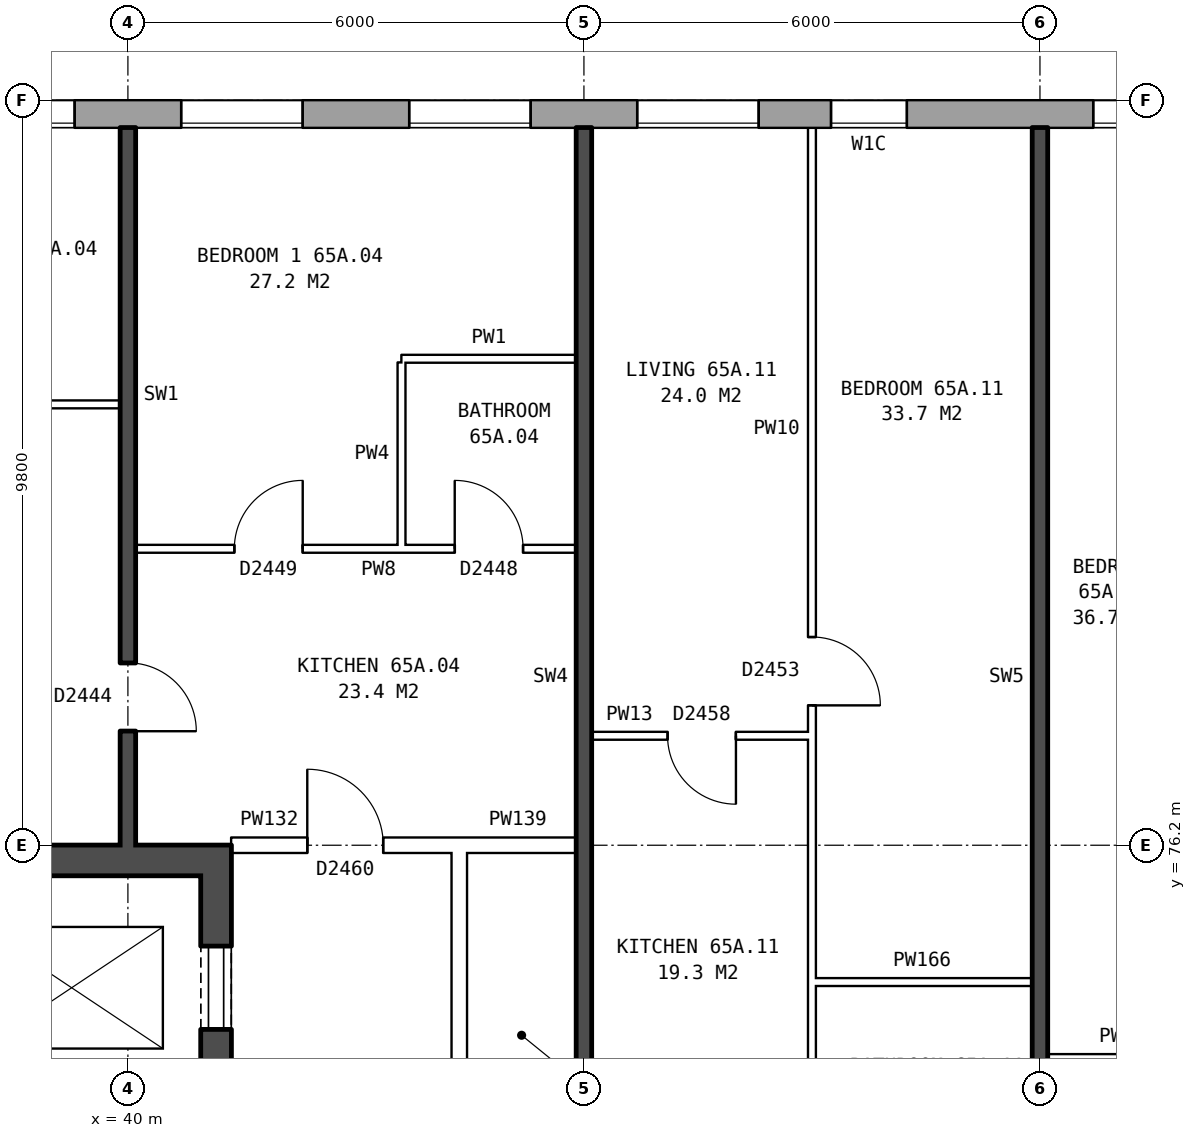
"""IFC4 building model, lengths in metres.
Left out: names, types, materials, properties, quantities, classifications, styles, units other than length and angle.
Written with IfcOpenShell. Run it as: python <this file> out.ifc"""

import sys

from ifc_helpers import new_model, si_unit, direction, frame, frame_2d, origin, place, context, subcontext, project, spatial, rectangle, extrude, element, fill, save


model = new_model("IFC4")
c1 = context("Model", 3, precision=1e-05, world=origin(), true_north=direction((0.0, 1.0)))
c2 = subcontext(c1, "Body", "Model", "MODEL_VIEW")
j1 = project(units=[si_unit("LENGTHUNIT", "METRE"), si_unit("PLANEANGLEUNIT", "RADIAN")], contexts=[c1])
p1 = place(None, origin())
s1 = spatial("IfcSite", under=j1, at=p1, CompositionType="ELEMENT")
p2 = place(p1, origin())
s2 = spatial("IfcBuilding", under=s1, at=p2, CompositionType="ELEMENT")
p3 = place(p2, frame((0.0, 0.0, 230.7)))
s3 = spatial("IfcBuildingStorey", under=s2, at=p3, CompositionType="ELEMENT", Elevation=230.7)
p4 = place(p3, frame((74.95, 85.82, 0.0), z_axis=(0.0, 0.0, 1.0), x_axis=(-1.0, 0.0, 0.0)))
e1 = element("IfcWall", 1, at=p4, inside=s3, PredefinedType="STANDARD", context=c2, shape_type="SweptSolid", body=[
    extrude(rectangle(XDim=39.875, YDim=0.36, at=frame_2d((19.938, 0.0))), origin(), (0.0, 0.0, 1.0), 2.85),
])
p5 = place(p4, frame((2.65, 0.0, 0.8)))
e2 = element("IfcOpeningElement", 2, at=p5, cuts=e1, PredefinedType="OPENING", context=c2, shape_type="SweptSolid", body=[
    extrude(rectangle(XDim=1.6, YDim=1.8, at=frame_2d((0.8, 0.9))), frame((0.0, 0.19, 0.0), z_axis=(0.0, -1.0, 0.0), x_axis=(1.0, 0.0, 0.0)), (0.0, 0.0, 1.0), 0.38),
])
p6 = place(p4, frame((5.65, 0.0, 0.8)))
e3 = element("IfcOpeningElement", 3, at=p6, cuts=e1, PredefinedType="OPENING", context=c2, shape_type="SweptSolid", body=[
    extrude(rectangle(XDim=1.6, YDim=1.8, at=frame_2d((0.8, 0.9))), frame((0.0, 0.19, 0.0), z_axis=(0.0, -1.0, 0.0), x_axis=(1.0, 0.0, 0.0)), (0.0, 0.0, 1.0), 0.38),
])
p7 = place(p4, frame((8.65, 0.0, 0.8)))
e4 = element("IfcOpeningElement", 4, at=p7, cuts=e1, PredefinedType="OPENING", context=c2, shape_type="SweptSolid", body=[
    extrude(rectangle(XDim=1.6, YDim=1.8, at=frame_2d((0.8, 0.9))), frame((0.0, 0.19, 0.0), z_axis=(0.0, -1.0, 0.0), x_axis=(1.0, 0.0, 0.0)), (0.0, 0.0, 1.0), 0.38),
])
p8 = place(p4, frame((11.65, 0.0, 0.8)))
e5 = element("IfcOpeningElement", 5, at=p8, cuts=e1, PredefinedType="OPENING", context=c2, shape_type="SweptSolid", body=[
    extrude(rectangle(XDim=1.6, YDim=1.8, at=frame_2d((0.8, 0.9))), frame((0.0, 0.19, 0.0), z_axis=(0.0, -1.0, 0.0), x_axis=(1.0, 0.0, 0.0)), (0.0, 0.0, 1.0), 0.38),
])
p9 = place(p4, frame((14.65, 0.0, 0.8)))
e6 = element("IfcOpeningElement", 6, at=p9, cuts=e1, PredefinedType="OPENING", context=c2, shape_type="SweptSolid", body=[
    extrude(rectangle(XDim=1.6, YDim=1.8, at=frame_2d((0.8, 0.9))), frame((0.0, 0.19, 0.0), z_axis=(0.0, -1.0, 0.0), x_axis=(1.0, 0.0, 0.0)), (0.0, 0.0, 1.0), 0.38),
])
p10 = place(p4, frame((17.15, 0.0, 1.7)))
e7 = element("IfcOpeningElement", 7, at=p10, cuts=e1, PredefinedType="OPENING", context=c2, shape_type="SweptSolid", body=[
    extrude(rectangle(XDim=0.6, YDim=0.9, at=frame_2d((0.3, 0.45))), frame((0.0, 0.19, 0.0), z_axis=(0.0, -1.0, 0.0), x_axis=(1.0, 0.0, 0.0)), (0.0, 0.0, 1.0), 0.38),
])
p11 = place(p4, frame((20.65, 0.0, 0.8)))
e8 = element("IfcOpeningElement", 8, at=p11, cuts=e1, PredefinedType="OPENING", context=c2, shape_type="SweptSolid", body=[
    extrude(rectangle(XDim=1.6, YDim=1.8, at=frame_2d((0.8, 0.9))), frame((0.0, 0.19, 0.0), z_axis=(0.0, -1.0, 0.0), x_axis=(1.0, 0.0, 0.0)), (0.0, 0.0, 1.0), 0.38),
])
p12 = place(p4, frame((24.7, 0.0, 0.8)))
e9 = element("IfcOpeningElement", 9, at=p12, cuts=e1, PredefinedType="OPENING", context=c2, shape_type="SweptSolid", body=[
    extrude(rectangle(XDim=1.0, YDim=1.8, at=frame_2d((0.5, 0.9))), frame((0.0, 0.19, 0.0), z_axis=(0.0, -1.0, 0.0), x_axis=(1.0, 0.0, 0.0)), (0.0, 0.0, 1.0), 0.38),
])
p13 = place(p4, frame((26.65, 0.0, 0.8)))
e10 = element("IfcOpeningElement", 10, at=p13, cuts=e1, PredefinedType="OPENING", context=c2, shape_type="SweptSolid", body=[
    extrude(rectangle(XDim=1.6, YDim=1.8, at=frame_2d((0.8, 0.9))), frame((0.0, 0.19, 0.0), z_axis=(0.0, -1.0, 0.0), x_axis=(1.0, 0.0, 0.0)), (0.0, 0.0, 1.0), 0.38),
])
p14 = place(p4, frame((29.65, 0.0, 0.8)))
e11 = element("IfcOpeningElement", 11, at=p14, cuts=e1, PredefinedType="OPENING", context=c2, shape_type="SweptSolid", body=[
    extrude(rectangle(XDim=1.6, YDim=1.8, at=frame_2d((0.8, 0.9))), frame((0.0, 0.19, 0.0), z_axis=(0.0, -1.0, 0.0), x_axis=(1.0, 0.0, 0.0)), (0.0, 0.0, 1.0), 0.38),
])
p15 = place(p4, frame((32.65, 0.0, 0.8)))
e12 = element("IfcOpeningElement", 12, at=p15, cuts=e1, PredefinedType="OPENING", context=c2, shape_type="SweptSolid", body=[
    extrude(rectangle(XDim=1.6, YDim=1.8, at=frame_2d((0.8, 0.9))), frame((0.0, 0.19, 0.0), z_axis=(0.0, -1.0, 0.0), x_axis=(1.0, 0.0, 0.0)), (0.0, 0.0, 1.0), 0.38),
])
p16 = place(p4, frame((35.65, 0.0, 0.8)))
e13 = element("IfcOpeningElement", 13, at=p16, cuts=e1, PredefinedType="OPENING", context=c2, shape_type="SweptSolid", body=[
    extrude(rectangle(XDim=1.6, YDim=1.8, at=frame_2d((0.8, 0.9))), frame((0.0, 0.19, 0.0), z_axis=(0.0, -1.0, 0.0), x_axis=(1.0, 0.0, 0.0)), (0.0, 0.0, 1.0), 0.38),
])
p17 = place(p4, frame((19.1, 0.0, 0.8)))
e14 = element("IfcOpeningElement", 14, at=p17, cuts=e1, PredefinedType="OPENING", context=c2, shape_type="SweptSolid", body=[
    extrude(rectangle(XDim=0.6, YDim=1.2, at=frame_2d((0.3, 0.6))), frame((0.0, 0.19, 0.0), z_axis=(0.0, -1.0, 0.0), x_axis=(1.0, 0.0, 0.0)), (0.0, 0.0, 1.0), 0.38),
])
p18 = place(p3, frame((41.16, 76.2, 0.0), z_axis=(0.0, 0.0, 1.0), x_axis=(0.0, -1.0, 0.0)))
e15 = element("IfcWall", 15, at=p18, inside=s3, PredefinedType="SHEAR", context=c2, shape_type="SweptSolid", body=[
    extrude(rectangle(XDim=12.4, YDim=0.4, at=frame_2d((6.2, 0.0))), origin(), (0.0, 0.0, 1.0), 2.85),
])
p19 = place(p18, frame((1.325, 0.0, 0.0)))
e16 = element("IfcOpeningElement", 16, at=p19, cuts=e15, PredefinedType="OPENING", context=c2, shape_type="SweptSolid", body=[
    extrude(rectangle(XDim=1.1, YDim=2.1, at=frame_2d((0.55, 1.05))), frame((0.0, 0.21, 0.0), z_axis=(0.0, -1.0, 0.0), x_axis=(1.0, 0.0, 0.0)), (0.0, 0.0, 1.0), 0.42),
])
p20 = place(p18, frame((4.225, 0.0, 0.0)))
e17 = element("IfcOpeningElement", 17, at=p20, cuts=e15, PredefinedType="OPENING", context=c2, shape_type="SweptSolid", body=[
    extrude(rectangle(XDim=0.85, YDim=2.1, at=frame_2d((0.425, 1.05))), frame((0.0, 0.21, 0.0), z_axis=(0.0, -1.0, 0.0), x_axis=(1.0, 0.0, 0.0)), (0.0, 0.0, 1.0), 0.42),
])
p21 = place(p18, frame((7.475, 0.0, 0.0)))
e18 = element("IfcOpeningElement", 18, at=p21, cuts=e15, PredefinedType="OPENING", context=c2, shape_type="SweptSolid", body=[
    extrude(rectangle(XDim=0.85, YDim=2.1, at=frame_2d((0.425, 1.05))), frame((0.0, 0.21, 0.0), z_axis=(0.0, -1.0, 0.0), x_axis=(1.0, 0.0, 0.0)), (0.0, 0.0, 1.0), 0.42),
])
p22 = place(p18, frame((9.9, 0.0, 0.0)))
e19 = element("IfcOpeningElement", 19, at=p22, cuts=e15, PredefinedType="OPENING", context=c2, shape_type="SweptSolid", body=[
    extrude(rectangle(XDim=1.1, YDim=2.1, at=frame_2d((0.55, 1.05))), frame((0.0, 0.21, 0.0), z_axis=(0.0, -1.0, 0.0), x_axis=(1.0, 0.0, 0.0)), (0.0, 0.0, 1.0), 0.42),
])
p23 = place(p3, frame((40.96, 76.0, 0.0), z_axis=(0.0, 0.0, 1.0), x_axis=(-1.0, 0.0, 0.0)))
e20 = element("IfcWall", 20, at=p23, inside=s3, PredefinedType="SHEAR", context=c2, shape_type="SweptSolid", body=[
    extrude(rectangle(XDim=8.2, YDim=0.4, at=frame_2d((4.1, 0.0))), origin(), (0.0, 0.0, 1.0), 2.85),
])
p24 = place(p3, frame((44.36, 63.9, 0.0), z_axis=(0.0, 0.0, 1.0), x_axis=(0.0, 1.0, 0.0)))
e21 = element("IfcWall", 21, at=p24, inside=s3, PredefinedType="PARTITIONING", context=c2, shape_type="SweptSolid", body=[
    extrude(rectangle(XDim=12.2, YDim=0.2, at=frame_2d((6.1, 0.0))), origin(), (0.0, 0.0, 1.0), 2.85),
])
p25 = place(p24, frame((5.1, 0.0, 0.0)))
e22 = element("IfcOpeningElement", 22, at=p25, cuts=e21, PredefinedType="OPENING", context=c2, shape_type="SweptSolid", body=[
    extrude(rectangle(XDim=2.0, YDim=2.1, at=frame_2d((1.0, 1.05))), frame((0.0, 0.11, 0.0), z_axis=(0.0, -1.0, 0.0), x_axis=(1.0, 0.0, 0.0)), (0.0, 0.0, 1.0), 0.22),
])
for number, where, z_axis, x_axis in (
    (23, (52.1, 73.4, 0.0), (0.0, 0.0, 1.0), (1.0, 0.0, 0.0)),
    (24, (49.0, 74.4, 0.0), (0.0, 0.0, 1.0), (1.0, 0.0, 0.0)),
):
    element("IfcWall", number, at=place(p3, frame(where, z_axis=z_axis, x_axis=x_axis)), inside=s3, PredefinedType="PARTITIONING", context=c2, shape_type="SweptSolid", body=[
        extrude(rectangle(XDim=2.9, YDim=0.1, at=frame_2d((1.45, 0.0))), origin(), (0.0, 0.0, 1.0), 2.85),
    ])
p26 = place(p3, frame((41.36, 76.2, 0.0), z_axis=(0.0, 0.0, 1.0), x_axis=(1.0, 0.0, 0.0)))
e25 = element("IfcWall", 25, at=p26, inside=s3, PredefinedType="PARTITIONING", context=c2, shape_type="SweptSolid", body=[
    extrude(rectangle(XDim=3.0, YDim=0.2, at=frame_2d((1.5, 0.0))), origin(), (0.0, 0.0, 1.0), 2.85),
])
p27 = place(p26, frame((1.0, 0.0, 0.0)))
e26 = element("IfcOpeningElement", 26, at=p27, cuts=e25, PredefinedType="OPENING", context=c2, shape_type="SweptSolid", body=[
    extrude(rectangle(XDim=1.0, YDim=2.1, at=frame_2d((0.5, 1.05))), frame((0.0, 0.11, 0.0), z_axis=(0.0, -1.0, 0.0), x_axis=(1.0, 0.0, 0.0)), (0.0, 0.0, 1.0), 0.22),
])
p28 = place(p3, frame((44.36, 76.2, 0.0), z_axis=(0.0, 0.0, 1.0), x_axis=(1.0, 0.0, 0.0)))
e27 = element("IfcWall", 27, at=p28, inside=s3, PredefinedType="PARTITIONING", context=c2, shape_type="SweptSolid", body=[
    extrude(rectangle(XDim=1.54, YDim=0.2, at=frame_2d((0.77, 0.0))), origin(), (0.0, 0.0, 1.0), 2.85),
])
p29 = place(p3, frame((46.1, 77.64, 0.0), z_axis=(0.0, 0.0, 1.0), x_axis=(1.0, 0.0, 0.0)))
e28 = element("IfcWall", 28, at=p29, inside=s3, PredefinedType="PARTITIONING", context=c2, shape_type="SweptSolid", body=[
    extrude(rectangle(XDim=2.9, YDim=0.1, at=frame_2d((1.45, 0.0))), origin(), (0.0, 0.0, 1.0), 2.85),
])
p30 = place(p29, frame((1.0, 0.0, 0.0)))
e29 = element("IfcOpeningElement", 29, at=p30, cuts=e28, PredefinedType="OPENING", context=c2, shape_type="SweptSolid", body=[
    extrude(rectangle(XDim=0.9, YDim=2.1, at=frame_2d((0.45, 1.05))), frame((0.0, 0.06, 0.0), z_axis=(0.0, -1.0, 0.0), x_axis=(1.0, 0.0, 0.0)), (0.0, 0.0, 1.0), 0.12),
])
p31 = place(p3, frame((40.1, 80.1, 0.0), z_axis=(0.0, 0.0, 1.0), x_axis=(1.0, 0.0, 0.0)))
e30 = element("IfcWall", 30, at=p31, inside=s3, PredefinedType="PARTITIONING", context=c2, shape_type="SweptSolid", body=[
    extrude(rectangle(XDim=5.8, YDim=0.1, at=frame_2d((2.9, 0.0))), origin(), (0.0, 0.0, 1.0), 2.85),
])
p32 = place(p31, frame((1.3, 0.0, 0.0)))
e31 = element("IfcOpeningElement", 31, at=p32, cuts=e30, PredefinedType="OPENING", context=c2, shape_type="SweptSolid", body=[
    extrude(rectangle(XDim=0.9, YDim=2.1, at=frame_2d((0.45, 1.05))), frame((0.0, 0.06, 0.0), z_axis=(0.0, -1.0, 0.0), x_axis=(1.0, 0.0, 0.0)), (0.0, 0.0, 1.0), 0.12),
])
p33 = place(p31, frame((4.2, 0.0, 0.0)))
e32 = element("IfcOpeningElement", 32, at=p33, cuts=e30, PredefinedType="OPENING", context=c2, shape_type="SweptSolid", body=[
    extrude(rectangle(XDim=0.9, YDim=2.1, at=frame_2d((0.45, 1.05))), frame((0.0, 0.06, 0.0), z_axis=(0.0, -1.0, 0.0), x_axis=(1.0, 0.0, 0.0)), (0.0, 0.0, 1.0), 0.12),
])
p34 = place(p3, frame((32.36, 82.0, 0.0), z_axis=(0.0, 0.0, 1.0), x_axis=(1.0, 0.0, 0.0)))
e33 = element("IfcWall", 33, at=p34, inside=s3, PredefinedType="PARTITIONING", context=c2, shape_type="SweptSolid", body=[
    extrude(rectangle(XDim=7.54, YDim=0.1, at=frame_2d((3.77, 0.0))), origin(), (0.0, 0.0, 1.0), 2.85),
])
p35 = place(p34, frame((3.32, 0.0, 0.0)))
e34 = element("IfcOpeningElement", 34, at=p35, cuts=e33, PredefinedType="OPENING", context=c2, shape_type="SweptSolid", body=[
    extrude(rectangle(XDim=0.9, YDim=2.1, at=frame_2d((0.45, 1.05))), frame((0.0, 0.06, 0.0), z_axis=(0.0, -1.0, 0.0), x_axis=(1.0, 0.0, 0.0)), (0.0, 0.0, 1.0), 0.12),
])
p36 = place(p3, frame((43.6, 82.6, 0.0), z_axis=(0.0, 0.0, 1.0), x_axis=(1.0, 0.0, 0.0)))
e35 = element("IfcWall", 35, at=p36, inside=s3, PredefinedType="PARTITIONING", context=c2, shape_type="SweptSolid", body=[
    extrude(rectangle(XDim=2.3, YDim=0.1, at=frame_2d((1.15, 0.0))), origin(), (0.0, 0.0, 1.0), 2.85),
])
p37 = place(p3, frame((40.0, 76.2, 0.0), z_axis=(0.0, 0.0, 1.0), x_axis=(0.0, 1.0, 0.0)))
e36 = element("IfcWall", 36, at=p37, inside=s3, PredefinedType="SOLIDWALL", context=c2, shape_type="SweptSolid", body=[
    extrude(rectangle(XDim=9.44, YDim=0.2, at=frame_2d((4.72, 0.0))), origin(), (0.0, 0.0, 1.0), 2.85),
])
p38 = place(p37, frame((1.5, 0.0, 0.0)))
e37 = element("IfcOpeningElement", 37, at=p38, cuts=e36, PredefinedType="OPENING", context=c2, shape_type="SweptSolid", body=[
    extrude(rectangle(XDim=0.9, YDim=2.1, at=frame_2d((0.45, 1.05))), frame((0.0, 0.11, 0.0), z_axis=(0.0, -1.0, 0.0), x_axis=(1.0, 0.0, 0.0)), (0.0, 0.0, 1.0), 0.22),
])
p39 = place(p3, frame((43.6, 80.15, 0.0), z_axis=(0.0, 0.0, 1.0), x_axis=(0.0, 1.0, 0.0)))
e38 = element("IfcWall", 38, at=p39, inside=s3, PredefinedType="PARTITIONING", context=c2, shape_type="SweptSolid", body=[
    extrude(rectangle(XDim=2.4, YDim=0.1, at=frame_2d((1.2, 0.0))), origin(), (0.0, 0.0, 1.0), 2.85),
])
p40 = place(p3, frame((46.0, 71.2, 0.0), z_axis=(0.0, 0.0, 1.0), x_axis=(0.0, 1.0, 0.0)))
e39 = element("IfcWall", 39, at=p40, inside=s3, PredefinedType="SOLIDWALL", context=c2, shape_type="SweptSolid", body=[
    extrude(rectangle(XDim=14.44, YDim=0.2, at=frame_2d((7.22, 0.0))), origin(), (0.0, 0.0, 1.0), 2.85),
])
p41 = place(p3, frame((49.0, 71.3, 0.0), z_axis=(0.0, 0.0, 1.0), x_axis=(0.0, 1.0, 0.0)))
e40 = element("IfcWall", 40, at=p41, inside=s3, PredefinedType="PARTITIONING", context=c2, shape_type="SweptSolid", body=[
    extrude(rectangle(XDim=14.34, YDim=0.1, at=frame_2d((7.17, 0.0))), origin(), (0.0, 0.0, 1.0), 2.85),
])
p42 = place(p41, frame((6.74, 0.0, 0.0)))
e41 = element("IfcOpeningElement", 41, at=p42, cuts=e40, PredefinedType="OPENING", context=c2, shape_type="SweptSolid", body=[
    extrude(rectangle(XDim=0.9, YDim=2.1, at=frame_2d((0.45, 1.05))), frame((0.0, 0.06, 0.0), z_axis=(0.0, -1.0, 0.0), x_axis=(1.0, 0.0, 0.0)), (0.0, 0.0, 1.0), 0.12),
])
p43 = place(p41, frame((0.4, 0.0, 0.0)))
e42 = element("IfcOpeningElement", 42, at=p43, cuts=e40, PredefinedType="OPENING", context=c2, shape_type="SweptSolid", body=[
    extrude(rectangle(XDim=0.9, YDim=2.1, at=frame_2d((0.45, 1.05))), frame((0.0, 0.06, 0.0), z_axis=(0.0, -1.0, 0.0), x_axis=(1.0, 0.0, 0.0)), (0.0, 0.0, 1.0), 0.12),
])
p44 = place(p3, frame((52.0, 71.2, 0.0), z_axis=(0.0, 0.0, 1.0), x_axis=(0.0, 1.0, 0.0)))
e43 = element("IfcWall", 43, at=p44, inside=s3, PredefinedType="SOLIDWALL", context=c2, shape_type="SweptSolid", body=[
    extrude(rectangle(XDim=14.44, YDim=0.2, at=frame_2d((7.22, 0.0))), origin(), (0.0, 0.0, 1.0), 2.85),
])
p45 = place(p11, origin())
e44 = element("IfcWindow", 44, at=p45, inside=s3, PartitioningType="SINGLE_PANEL", PredefinedType="WINDOW", context=c2, shape_type="SweptSolid", body=[
    extrude(rectangle(XDim=1.6, YDim=1.8, at=frame_2d((0.8, 0.9))), frame((0.0, 0.15, 0.0), z_axis=(0.0, -1.0, 0.0), x_axis=(1.0, 0.0, 0.0)), (0.0, 0.0, 1.0), 0.06),
])
fill(e8, e44)
p46 = place(p12, origin())
e45 = element("IfcWindow", 45, at=p46, inside=s3, PartitioningType="SINGLE_PANEL", PredefinedType="WINDOW", context=c2, shape_type="SweptSolid", body=[
    extrude(rectangle(XDim=1.0, YDim=1.8, at=frame_2d((0.5, 0.9))), frame((0.0, 0.15, 0.0), z_axis=(0.0, -1.0, 0.0), x_axis=(1.0, 0.0, 0.0)), (0.0, 0.0, 1.0), 0.06),
])
fill(e9, e45)
p47 = place(p13, origin())
e46 = element("IfcWindow", 46, at=p47, inside=s3, PartitioningType="SINGLE_PANEL", PredefinedType="WINDOW", context=c2, shape_type="SweptSolid", body=[
    extrude(rectangle(XDim=1.6, YDim=1.8, at=frame_2d((0.8, 0.9))), frame((0.0, 0.15, 0.0), z_axis=(0.0, -1.0, 0.0), x_axis=(1.0, 0.0, 0.0)), (0.0, 0.0, 1.0), 0.06),
])
fill(e10, e46)
p48 = place(p14, origin())
e47 = element("IfcWindow", 47, at=p48, inside=s3, PartitioningType="SINGLE_PANEL", PredefinedType="WINDOW", context=c2, shape_type="SweptSolid", body=[
    extrude(rectangle(XDim=1.6, YDim=1.8, at=frame_2d((0.8, 0.9))), frame((0.0, 0.15, 0.0), z_axis=(0.0, -1.0, 0.0), x_axis=(1.0, 0.0, 0.0)), (0.0, 0.0, 1.0), 0.06),
])
fill(e11, e47)
p49 = place(p15, origin())
e48 = element("IfcWindow", 48, at=p49, inside=s3, PartitioningType="SINGLE_PANEL", PredefinedType="WINDOW", context=c2, shape_type="SweptSolid", body=[
    extrude(rectangle(XDim=1.6, YDim=1.8, at=frame_2d((0.8, 0.9))), frame((0.0, 0.15, 0.0), z_axis=(0.0, -1.0, 0.0), x_axis=(1.0, 0.0, 0.0)), (0.0, 0.0, 1.0), 0.06),
])
fill(e12, e48)
p50 = place(p16, origin())
e49 = element("IfcWindow", 49, at=p50, inside=s3, PartitioningType="SINGLE_PANEL", PredefinedType="WINDOW", context=c2, shape_type="SweptSolid", body=[
    extrude(rectangle(XDim=1.6, YDim=1.8, at=frame_2d((0.8, 0.9))), frame((0.0, 0.15, 0.0), z_axis=(0.0, -1.0, 0.0), x_axis=(1.0, 0.0, 0.0)), (0.0, 0.0, 1.0), 0.06),
])
fill(e13, e49)
p51 = place(p19, origin())
e50 = element("IfcDoor", 50, at=p51, inside=s3, OperationType="DOUBLE_DOOR_SLIDING", PredefinedType="DOOR", context=c2, shape_type="SweptSolid", body=[
    extrude(rectangle(XDim=1.1, YDim=2.1, at=frame_2d((0.55, 1.05))), frame((0.0, -0.135, 0.0), z_axis=(0.0, -1.0, 0.0), x_axis=(1.0, 0.0, 0.0)), (0.0, 0.0, 1.0), 0.05),
])
fill(e16, e50)
p52 = place(p32, origin())
e51 = element("IfcDoor", 51, at=p52, inside=s3, OperationType="SINGLE_SWING_RIGHT", PredefinedType="DOOR", context=c2, shape_type="SweptSolid", body=[
    extrude(rectangle(XDim=0.9, YDim=2.1, at=frame_2d((0.45, 1.05))), frame((0.0, 0.025, 0.0), z_axis=(0.0, -1.0, 0.0), x_axis=(1.0, 0.0, 0.0)), (0.0, 0.0, 1.0), 0.05),
])
fill(e31, e51)
p53 = place(p27, origin())
e52 = element("IfcDoor", 52, at=p53, inside=s3, OperationType="SINGLE_SWING_LEFT", PredefinedType="DOOR", context=c2, shape_type="SweptSolid", body=[
    extrude(rectangle(XDim=1.0, YDim=2.1, at=frame_2d((0.5, 1.05))), frame((0.0, 0.025, 0.0), z_axis=(0.0, -1.0, 0.0), x_axis=(1.0, 0.0, 0.0)), (0.0, 0.0, 1.0), 0.05),
])
fill(e26, e52)
p54 = place(p38, frame((0.9, 0.0, 0.0), z_axis=(0.0, 0.0, 1.0), x_axis=(-1.0, 0.0, 0.0)))
e53 = element("IfcDoor", 53, at=p54, inside=s3, OperationType="SINGLE_SWING_RIGHT", PredefinedType="DOOR", context=c2, shape_type="SweptSolid", body=[
    extrude(rectangle(XDim=0.9, YDim=2.1, at=frame_2d((0.45, 1.05))), frame((0.0, 0.025, 0.0), z_axis=(0.0, -1.0, 0.0), x_axis=(1.0, 0.0, 0.0)), (0.0, 0.0, 1.0), 0.05),
])
fill(e37, e53)
p55 = place(p33, origin())
e54 = element("IfcDoor", 54, at=p55, inside=s3, OperationType="SINGLE_SWING_LEFT", PredefinedType="DOOR", context=c2, shape_type="SweptSolid", body=[
    extrude(rectangle(XDim=0.9, YDim=2.1, at=frame_2d((0.45, 1.05))), frame((0.0, 0.025, 0.0), z_axis=(0.0, -1.0, 0.0), x_axis=(1.0, 0.0, 0.0)), (0.0, 0.0, 1.0), 0.05),
])
fill(e32, e54)
p56 = place(p42, frame((0.9, 0.0, 0.0), z_axis=(0.0, 0.0, 1.0), x_axis=(-1.0, 0.0, 0.0)))
e55 = element("IfcDoor", 55, at=p56, inside=s3, OperationType="SINGLE_SWING_RIGHT", PredefinedType="DOOR", context=c2, shape_type="SweptSolid", body=[
    extrude(rectangle(XDim=0.9, YDim=2.1, at=frame_2d((0.45, 1.05))), frame((0.0, 0.025, 0.0), z_axis=(0.0, -1.0, 0.0), x_axis=(1.0, 0.0, 0.0)), (0.0, 0.0, 1.0), 0.05),
])
fill(e41, e55)
p57 = place(p30, frame((0.9, 0.0, 0.0), z_axis=(0.0, 0.0, 1.0), x_axis=(-1.0, 0.0, 0.0)))
e56 = element("IfcDoor", 56, at=p57, inside=s3, OperationType="SINGLE_SWING_LEFT", PredefinedType="DOOR", context=c2, shape_type="SweptSolid", body=[
    extrude(rectangle(XDim=0.9, YDim=2.1, at=frame_2d((0.45, 1.05))), frame((0.0, 0.025, 0.0), z_axis=(0.0, -1.0, 0.0), x_axis=(1.0, 0.0, 0.0)), (0.0, 0.0, 1.0), 0.05),
])
fill(e29, e56)
save(model, sys.argv[1])
